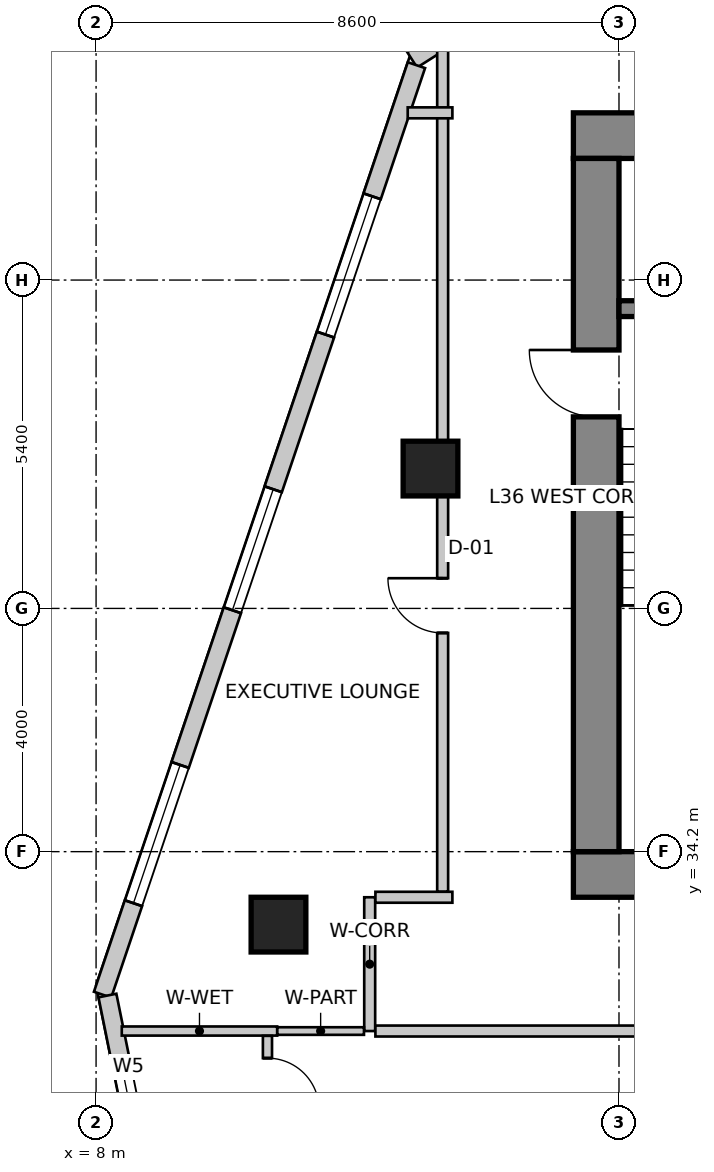
"""IFC4 building model, lengths in metres.
Left out: names, types, materials, properties, quantities, classifications, styles, units other than length and angle.
Written with IfcOpenShell. Run it as: python <this file> out.ifc"""

import sys

from ifc_helpers import new_model, si_unit, direction, frame, frame_2d, origin, origin_2d, place, context, subcontext, project, spatial, rectangle, extrude, source, transform, mapped, element, fill, save


model = new_model("IFC4")
c1 = context("Model", 3, precision=1e-05, world=origin(), true_north=direction((0.0, 1.0)))
c2 = subcontext(c1, "Body", "Model", "MODEL_VIEW")
j1 = project(units=[si_unit("LENGTHUNIT", "METRE"), si_unit("PLANEANGLEUNIT", "RADIAN")], contexts=[c1])
p1 = place(None, origin())
s1 = spatial("IfcSite", under=j1, at=p1, CompositionType="ELEMENT")
p2 = place(p1, origin())
s2 = spatial("IfcBuilding", under=s1, at=p2, CompositionType="ELEMENT")
p3 = place(p2, frame((0.0, 0.0, 146.6)))
s3 = spatial("IfcBuildingStorey", under=s2, at=p3, CompositionType="ELEMENT", Elevation=146.6)
p4 = place(p3, frame((15.85, 45.975, 0.0), z_axis=(0.0, 0.0, 1.0), x_axis=(1.0, 0.0, 0.0)))
e1 = element("IfcWall", 1, at=p4, inside=s3, PredefinedType="SHEAR", context=c2, shape_type="SweptSolid", body=[
    extrude(rectangle(XDim=15.9, YDim=0.75, at=frame_2d((7.95, 0.0))), origin(), (0.0, 0.0, 1.0), 3.6),
])
p5 = place(p3, frame((15.85, 33.825, 0.0), z_axis=(0.0, 0.0, 1.0), x_axis=(1.0, 0.0, 0.0)))
e2 = element("IfcWall", 2, at=p5, inside=s3, PredefinedType="SHEAR", context=c2, shape_type="SweptSolid", body=[
    extrude(rectangle(XDim=15.9, YDim=0.75, at=frame_2d((7.95, 0.0))), origin(), (0.0, 0.0, 1.0), 3.6),
])
m1 = source(origin(), c2, "Body", "SweptSolid", [
    extrude(rectangle(XDim=1.3, YDim=2.15, at=frame_2d((0.65, 1.075))), frame((0.0, 0.385, 0.0), z_axis=(0.0, -1.0, 0.0), x_axis=(1.0, 0.0, 0.0)), (0.0, 0.0, 1.0), 0.77),
])
p6 = place(p5, frame((10.08, 0.0, 0.0)))
e3 = element("IfcOpeningElement", 3, at=p6, cuts=e2, PredefinedType="OPENING", context=c2, shape_type="MappedRepresentation", body=[
    mapped(m1, transform((0.0, 0.0, 0.0), scale=1.0)),
])
p7 = place(p3, frame((16.225, 34.2, 0.0), z_axis=(0.0, 0.0, 1.0), x_axis=(0.0, 1.0, 0.0)))
e4 = element("IfcWall", 4, at=p7, inside=s3, PredefinedType="SHEAR", context=c2, shape_type="SweptSolid", body=[
    extrude(rectangle(XDim=11.4, YDim=0.75, at=frame_2d((5.7, 0.0))), origin(), (0.0, 0.0, 1.0), 3.6),
])
m2 = source(origin(), c2, "Body", "SweptSolid", [
    extrude(rectangle(XDim=1.1, YDim=2.15, at=frame_2d((0.55, 1.075))), frame((0.0, 0.385, 0.0), z_axis=(0.0, -1.0, 0.0), x_axis=(1.0, 0.0, 0.0)), (0.0, 0.0, 1.0), 0.77),
])
p8 = place(p7, frame((7.15, 0.0, 0.0)))
e5 = element("IfcOpeningElement", 5, at=p8, cuts=e4, PredefinedType="OPENING", context=c2, shape_type="MappedRepresentation", body=[
    mapped(m2, transform((0.0, 0.0, 0.0), scale=1.0)),
])
p9 = place(p3, frame((16.6, 43.13, 0.0), z_axis=(0.0, 0.0, 1.0), x_axis=(1.0, 0.0, 0.0)))
e6 = element("IfcWall", 6, at=p9, inside=s3, PredefinedType="SHEAR", context=c2, shape_type="SweptSolid", body=[
    extrude(rectangle(XDim=3.5, YDim=0.26, at=frame_2d((1.75, 0.0))), origin(), (0.0, 0.0, 1.0), 3.6),
])
m3 = source(origin(), c2, "Body", "SweptSolid", [
    extrude(rectangle(XDim=0.9, YDim=0.9, at=origin_2d()), origin(), (0.0, 0.0, 1.0), 3.6),
])
for number, where, z_axis, x_axis in (
    (7, (11.0, 33.0, 0.0), (0.0, 0.0, 1.0), (1.0, 0.0, 0.0)),
    (8, (13.5, 40.5, 0.0), (0.0, 0.0, 1.0), (1.0, 0.0, 0.0)),
):
    element("IfcColumn", number, at=place(p3, frame(where, z_axis=z_axis, x_axis=x_axis)), inside=s3, PredefinedType="COLUMN", context=c2, shape_type="MappedRepresentation", body=[
        mapped(m3, transform((0.0, 0.0, 0.0), scale=1.0)),
    ])
p10 = place(p3, frame((21.875, 52.742, 0.0), z_axis=(0.0, 0.0, 1.0), x_axis=(-0.843662465249, -0.536873956092, 0.0)))
e9 = element("IfcWall", 9, at=p10, inside=s3, PredefinedType="SOLIDWALL", context=c2, shape_type="SweptSolid", body=[
    extrude(rectangle(XDim=10.284, YDim=0.3, at=frame_2d((5.142, 0.0))), origin(), (0.0, 0.0, 1.0), 3.35),
])
m4 = source(origin(), c2, "Body", "SweptSolid", [
    extrude(rectangle(XDim=2.1, YDim=2.0, at=frame_2d((1.05, 1.0))), frame((0.0, 0.16, 0.0), z_axis=(0.0, -1.0, 0.0), x_axis=(1.0, 0.0, 0.0)), (0.0, 0.0, 1.0), 0.32),
])
p11 = place(p10, frame((2.806, 0.0, 0.85)))
e10 = element("IfcOpeningElement", 10, at=p11, cuts=e9, PredefinedType="OPENING", context=c2, shape_type="MappedRepresentation", body=[
    mapped(m4, transform((0.0, 0.0, 0.0), scale=1.0)),
])
m5 = source(origin(), c2, "Body", "SweptSolid", [
    extrude(rectangle(XDim=1.2, YDim=1.6, at=frame_2d((0.6, 0.8))), frame((0.0, 0.16, 0.0), z_axis=(0.0, -1.0, 0.0), x_axis=(1.0, 0.0, 0.0)), (0.0, 0.0, 1.0), 0.32),
])
p12 = place(p10, frame((8.087, 0.0, 0.85)))
e11 = element("IfcOpeningElement", 11, at=p12, cuts=e9, PredefinedType="OPENING", context=c2, shape_type="MappedRepresentation", body=[
    mapped(m5, transform((0.0, 0.0, 0.0), scale=1.0)),
])
p13 = place(p3, frame((13.269, 47.134, 0.0), z_axis=(0.0, 0.0, 1.0), x_axis=(-0.319929773322, -0.947441259468, 0.0)))
e12 = element("IfcWall", 12, at=p13, inside=s3, PredefinedType="SOLIDWALL", context=c2, shape_type="SweptSolid", body=[
    extrude(rectangle(XDim=16.134, YDim=0.3, at=frame_2d((8.067, 0.0))), origin(), (0.0, 0.0, 1.0), 3.35),
])
m6 = source(origin(), c2, "Body", "SweptSolid", [
    extrude(rectangle(XDim=2.4, YDim=2.2, at=frame_2d((1.2, 1.1))), frame((0.0, 0.16, 0.0), z_axis=(0.0, -1.0, 0.0), x_axis=(1.0, 0.0, 0.0)), (0.0, 0.0, 1.0), 0.32),
])
p14 = place(p13, frame((2.276, 0.0, 0.85)))
e13 = element("IfcOpeningElement", 13, at=p14, cuts=e12, PredefinedType="OPENING", context=c2, shape_type="MappedRepresentation", body=[
    mapped(m6, transform((0.0, 0.0, 0.0), scale=1.0)),
])
p15 = place(p13, frame((7.361, 0.0, 0.85)))
e14 = element("IfcOpeningElement", 14, at=p15, cuts=e12, PredefinedType="OPENING", context=c2, shape_type="MappedRepresentation", body=[
    mapped(m4, transform((0.0, 0.0, 0.0), scale=1.0)),
])
p16 = place(p13, frame((12.146, 0.0, 0.85)))
e15 = element("IfcOpeningElement", 15, at=p16, cuts=e12, PredefinedType="OPENING", context=c2, shape_type="MappedRepresentation", body=[
    mapped(m6, transform((0.0, 0.0, 0.0), scale=1.0)),
])
p17 = place(p3, frame((8.187, 31.834, 0.0), z_axis=(0.0, 0.0, 1.0), x_axis=(0.198869838988, -0.980025911464, 0.0)))
e16 = element("IfcWall", 16, at=p17, inside=s3, PredefinedType="SOLIDWALL", context=c2, shape_type="SweptSolid", body=[
    extrude(rectangle(XDim=16.363, YDim=0.3, at=frame_2d((8.182, 0.0))), origin(), (0.0, 0.0, 1.0), 3.35),
])
p18 = place(p17, frame((1.131, 0.0, 0.85)))
e17 = element("IfcOpeningElement", 17, at=p18, cuts=e16, PredefinedType="OPENING", context=c2, shape_type="MappedRepresentation", body=[
    mapped(m5, transform((0.0, 0.0, 0.0), scale=1.0)),
])
p19 = place(p17, frame((4.345, 0.0, 0.85)))
e18 = element("IfcOpeningElement", 18, at=p19, cuts=e16, PredefinedType="OPENING", context=c2, shape_type="MappedRepresentation", body=[
    mapped(m4, transform((0.0, 0.0, 0.0), scale=1.0)),
])
p20 = place(p17, frame((8.857, 0.0, 0.85)))
e19 = element("IfcOpeningElement", 19, at=p20, cuts=e16, PredefinedType="OPENING", context=c2, shape_type="MappedRepresentation", body=[
    mapped(m6, transform((0.0, 0.0, 0.0), scale=1.0)),
])
p21 = place(p17, frame((13.386, 0.0, 0.85)))
e20 = element("IfcOpeningElement", 20, at=p21, cuts=e16, PredefinedType="OPENING", context=c2, shape_type="MappedRepresentation", body=[
    mapped(m4, transform((0.0, 0.0, 0.0), scale=1.0)),
])
p22 = place(p3, frame((12.5, 31.25, 0.0), z_axis=(0.0, 0.0, 1.0), x_axis=(0.0, 1.0, 0.0)))
e21 = element("IfcWall", 21, at=p22, inside=s3, PredefinedType="PARTITIONING", context=c2, shape_type="SweptSolid", body=[
    extrude(rectangle(XDim=2.2, YDim=0.18, at=frame_2d((1.1, 0.0))), origin(), (0.0, 0.0, 1.0), 2.935),
])
p23 = place(p3, frame((12.594, 33.45, 0.0), z_axis=(0.0, 0.0, 1.0), x_axis=(1.0, 0.0, 0.0)))
e22 = element("IfcWall", 22, at=p23, inside=s3, PredefinedType="PARTITIONING", context=c2, shape_type="SweptSolid", body=[
    extrude(rectangle(XDim=1.266, YDim=0.18, at=frame_2d((0.633, 0.0))), origin(), (0.0, 0.0, 1.0), 3.35),
])
p24 = place(p3, frame((17.96, 31.25, 0.0), z_axis=(0.0, 0.0, 1.0), x_axis=(-1.0, 0.0, 0.0)))
e23 = element("IfcWall", 23, at=p24, inside=s3, PredefinedType="PARTITIONING", context=c2, shape_type="SweptSolid", body=[
    extrude(rectangle(XDim=5.366, YDim=0.18, at=frame_2d((2.683, 0.0))), origin(), (0.0, 0.0, 1.0), 2.935),
])
p25 = place(p3, frame((13.7, 33.544, 0.0), z_axis=(0.0, 0.0, 1.0), x_axis=(0.0, 1.0, 0.0)))
e24 = element("IfcWall", 24, at=p25, inside=s3, PredefinedType="PARTITIONING", context=c2, shape_type="SweptSolid", body=[
    extrude(rectangle(XDim=13.86, YDim=0.18, at=frame_2d((6.93, 0.0))), origin(), (0.0, 0.0, 1.0), 2.492),
])
m7 = source(origin(), c2, "Body", "SweptSolid", [
    extrude(rectangle(XDim=0.9, YDim=2.15, at=frame_2d((0.45, 1.075))), frame((0.0, 0.1, 0.0), z_axis=(0.0, -1.0, 0.0), x_axis=(1.0, 0.0, 0.0)), (0.0, 0.0, 1.0), 0.2),
])
p26 = place(p25, frame((4.253, 0.0, 0.0)))
e25 = element("IfcOpeningElement", 25, at=p26, cuts=e24, PredefinedType="OPENING", context=c2, shape_type="MappedRepresentation", body=[
    mapped(m7, transform((0.0, 0.0, 0.0), scale=1.0)),
])
p27 = place(p3, frame((13.86, 46.35, 0.0), z_axis=(0.0, 0.0, 1.0), x_axis=(-1.0, 0.0, 0.0)))
e26 = element("IfcWall", 26, at=p27, inside=s3, PredefinedType="PARTITIONING", context=c2, shape_type="SweptSolid", body=[
    extrude(rectangle(XDim=0.735, YDim=0.18, at=frame_2d((0.367, 0.0))), origin(), (0.0, 0.0, 1.0), 3.35),
])
p28 = place(p3, frame((10.979, 31.25, 0.0), z_axis=(0.0, 0.0, 1.0), x_axis=(-1.0, 0.0, 0.0)))
e27 = element("IfcWall", 27, at=p28, inside=s3, PredefinedType="PARTITIONING", context=c2, shape_type="SweptSolid", body=[
    extrude(rectangle(XDim=2.556, YDim=0.15, at=frame_2d((1.278, 0.0))), origin(), (0.0, 0.0, 1.0), 2.492),
])
p29 = place(p3, frame((12.406, 31.25, 0.0), z_axis=(0.0, 0.0, 1.0), x_axis=(-1.0, 0.0, 0.0)))
e28 = element("IfcWall", 28, at=p29, inside=s3, PredefinedType="PARTITIONING", context=c2, shape_type="SweptSolid", body=[
    extrude(rectangle(XDim=1.426, YDim=0.125, at=frame_2d((0.713, 0.0))), origin(), (0.0, 0.0, 1.0), 2.492),
])
p30 = place(p3, frame((10.819, 31.171, 0.0), z_axis=(0.0, 0.0, 1.0), x_axis=(0.0, -1.0, 0.0)))
e29 = element("IfcWall", 29, at=p30, inside=s3, PredefinedType="PARTITIONING", context=c2, shape_type="SweptSolid", body=[
    extrude(rectangle(XDim=2.101, YDim=0.15, at=frame_2d((1.05, 0.0))), origin(), (0.0, 0.0, 1.0), 2.492),
])
m8 = source(origin(), c2, "Body", "SweptSolid", [
    extrude(rectangle(XDim=0.85, YDim=2.15, at=frame_2d((0.425, 1.075))), frame((0.0, 0.085, 0.0), z_axis=(0.0, -1.0, 0.0), x_axis=(1.0, 0.0, 0.0)), (0.0, 0.0, 1.0), 0.17),
])
p31 = place(p30, frame((0.366, 0.0, 0.0)))
e30 = element("IfcOpeningElement", 30, at=p31, cuts=e29, PredefinedType="OPENING", context=c2, shape_type="MappedRepresentation", body=[
    mapped(m8, transform((0.0, 0.0, 0.0), scale=1.0)),
])
m9 = source(origin(), c2, "Body", "SweptSolid", [
    extrude(rectangle(XDim=2.4, YDim=2.2, at=frame_2d((1.2, 1.1))), frame((0.0, -0.015, 0.0), z_axis=(0.0, -1.0, 0.0), x_axis=(1.0, 0.0, 0.0)), (0.0, 0.0, 1.0), 0.06),
])
p32 = place(p14, origin())
e31 = element("IfcWindow", 31, at=p32, inside=s3, PartitioningType="SINGLE_PANEL", PredefinedType="WINDOW", context=c2, shape_type="MappedRepresentation", body=[
    mapped(m9, transform((0.0, 0.0, 0.0), scale=1.0)),
])
fill(e13, e31)
m10 = source(origin(), c2, "Body", "SweptSolid", [
    extrude(rectangle(XDim=2.1, YDim=2.0, at=frame_2d((1.05, 1.0))), frame((0.0, -0.015, 0.0), z_axis=(0.0, -1.0, 0.0), x_axis=(1.0, 0.0, 0.0)), (0.0, 0.0, 1.0), 0.06),
])
p33 = place(p15, origin())
e32 = element("IfcWindow", 32, at=p33, inside=s3, PartitioningType="SINGLE_PANEL", PredefinedType="WINDOW", context=c2, shape_type="MappedRepresentation", body=[
    mapped(m10, transform((0.0, 0.0, 0.0), scale=1.0)),
])
fill(e14, e32)
p34 = place(p16, origin())
e33 = element("IfcWindow", 33, at=p34, inside=s3, PartitioningType="SINGLE_PANEL", PredefinedType="WINDOW", context=c2, shape_type="MappedRepresentation", body=[
    mapped(m9, transform((0.0, 0.0, 0.0), scale=1.0)),
])
fill(e15, e33)
m11 = source(origin(), c2, "Body", "SweptSolid", [
    extrude(rectangle(XDim=1.2, YDim=1.6, at=frame_2d((0.6, 0.8))), frame((0.0, -0.015, 0.0), z_axis=(0.0, -1.0, 0.0), x_axis=(1.0, 0.0, 0.0)), (0.0, 0.0, 1.0), 0.06),
])
p35 = place(p18, origin())
e34 = element("IfcWindow", 34, at=p35, inside=s3, PartitioningType="SINGLE_PANEL", PredefinedType="WINDOW", context=c2, shape_type="MappedRepresentation", body=[
    mapped(m11, transform((0.0, 0.0, 0.0), scale=1.0)),
])
fill(e17, e34)
m12 = source(origin(), c2, "Body", "SweptSolid", [
    extrude(rectangle(XDim=1.1, YDim=2.15, at=frame_2d((0.55, 1.075))), frame((0.0, 0.025, 0.0), z_axis=(0.0, -1.0, 0.0), x_axis=(1.0, 0.0, 0.0)), (0.0, 0.0, 1.0), 0.05),
])
p36 = place(p8, origin())
e35 = element("IfcDoor", 35, at=p36, inside=s3, OperationType="SINGLE_SWING_RIGHT", PredefinedType="DOOR", context=c2, shape_type="MappedRepresentation", body=[
    mapped(m12, transform((0.0, 0.0, 0.0), scale=1.0)),
])
fill(e5, e35)
m13 = source(origin(), c2, "Body", "SweptSolid", [
    extrude(rectangle(XDim=0.9, YDim=2.15, at=frame_2d((0.45, 1.075))), frame((0.0, 0.025, 0.0), z_axis=(0.0, -1.0, 0.0), x_axis=(1.0, 0.0, 0.0)), (0.0, 0.0, 1.0), 0.05),
])
p37 = place(p26, origin())
e36 = element("IfcDoor", 36, at=p37, inside=s3, OperationType="SINGLE_SWING_RIGHT", PredefinedType="DOOR", context=c2, shape_type="MappedRepresentation", body=[
    mapped(m13, transform((0.0, 0.0, 0.0), scale=1.0)),
])
fill(e25, e36)
m14 = source(origin(), c2, "Body", "SweptSolid", [
    extrude(rectangle(XDim=0.85, YDim=2.15, at=frame_2d((0.425, 1.075))), frame((0.0, 0.025, 0.0), z_axis=(0.0, -1.0, 0.0), x_axis=(1.0, 0.0, 0.0)), (0.0, 0.0, 1.0), 0.05),
])
p38 = place(p31, origin())
e37 = element("IfcDoor", 37, at=p38, inside=s3, OperationType="SINGLE_SWING_RIGHT", PredefinedType="DOOR", context=c2, shape_type="MappedRepresentation", body=[
    mapped(m14, transform((0.0, 0.0, 0.0), scale=1.0)),
])
fill(e30, e37)
save(model, sys.argv[1])
